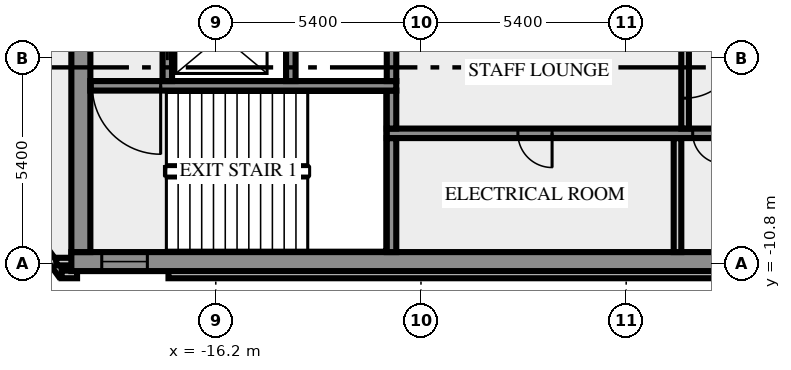
"""IFC4 building model, lengths in metres.
Left out: names, types, materials, properties, quantities, classifications, styles, units other than length and angle.
Written with IfcOpenShell. Run it as: python <this file> out.ifc"""

import sys

from ifc_helpers import new_model, si_unit, direction, frame, frame_2d, origin, place, context, subcontext, project, spatial, rectangle, extrude, element, fill, save


model = new_model("IFC4")
c1 = context("Model", 3, precision=1e-05, world=origin(), true_north=direction((0.0, 1.0)))
c2 = subcontext(c1, "Body", "Model", "MODEL_VIEW")
j1 = project(units=[si_unit("LENGTHUNIT", "METRE"), si_unit("PLANEANGLEUNIT", "RADIAN")], contexts=[c1])
p1 = place(None, origin())
s1 = spatial("IfcSite", under=j1, at=p1, CompositionType="ELEMENT")
p2 = place(p1, origin())
s2 = spatial("IfcBuilding", under=s1, at=p2, CompositionType="ELEMENT")
p3 = place(p2, frame((0.0, 0.0, 234.0)))
s3 = spatial("IfcBuildingStorey", under=s2, at=p3, CompositionType="ELEMENT", Elevation=234.0)
p4 = place(p3, frame((-21.833, -8.909, 0.0), z_axis=(0.0, 0.0, 1.0), x_axis=(0.587766567315, -0.809030569476, 0.0)))
e1 = element("IfcWall", 1, at=p4, inside=s3, PredefinedType="SOLIDWALL", context=c2, shape_type="SweptSolid", body=[
    extrude(rectangle(XDim=2.688, YDim=0.2, at=frame_2d((1.344, 0.0))), origin(), (0.0, 0.0, 1.0), 3.65),
])
p5 = place(p3, frame((-20.256, -11.088, 0.0), z_axis=(0.0, 0.0, 1.0), x_axis=(1.0, 0.0, 0.0)))
e2 = element("IfcWall", 2, at=p5, inside=s3, PredefinedType="SOLIDWALL", context=c2, shape_type="SweptSolid", body=[
    extrude(rectangle(XDim=0.406, YDim=0.2, at=frame_2d((0.203, 0.0))), origin(), (0.0, 0.0, 1.0), 3.65),
])
p6 = place(p3, frame((-17.444, -11.088, 0.0), z_axis=(0.0, 0.0, 1.0), x_axis=(1.0, 0.0, 0.0)))
e3 = element("IfcWall", 3, at=p6, inside=s3, PredefinedType="SOLIDWALL", context=c2, shape_type="SweptSolid", body=[
    extrude(rectangle(XDim=34.888, YDim=0.2, at=frame_2d((17.444, 0.0))), origin(), (0.0, 0.0, 1.0), 3.65),
])
p7 = place(p3, frame((-19.98, -10.75, 0.0), z_axis=(0.0, 0.0, 1.0), x_axis=(-1.0, 0.0, 0.0)))
e4 = element("IfcWall", 4, at=p7, inside=s3, PredefinedType="SOLIDWALL", context=c2, shape_type="SweptSolid", body=[
    extrude(rectangle(XDim=0.417, YDim=0.2, at=frame_2d((0.208, 0.0))), origin(), (0.0, 0.0, 1.0), 3.65),
])
p8 = place(p3, frame((-20.0, -10.75, 0.0), z_axis=(0.0, 0.0, 1.0), x_axis=(1.0, 0.0, 0.0)))
e5 = element("IfcWall", 5, at=p8, inside=s3, PredefinedType="SHEAR", context=c2, shape_type="SweptSolid", body=[
    extrude(rectangle(XDim=40.0, YDim=0.5, at=frame_2d((20.0, 0.0))), origin(), (0.0, 0.0, 1.0), 3.65),
])
p9 = place(p8, frame((0.8, 0.0, 1.0)))
e6 = element("IfcOpeningElement", 6, at=p9, cuts=e5, PredefinedType="OPENING", context=c2, shape_type="SweptSolid", body=[
    extrude(rectangle(XDim=1.2, YDim=1.2, at=frame_2d((0.6, 0.6))), frame((0.0, 0.26, 0.0), z_axis=(0.0, -1.0, 0.0), x_axis=(1.0, 0.0, 0.0)), (0.0, 0.0, 1.0), 0.52),
])
p10 = place(p8, frame((38.0, 0.0, 1.0)))
e7 = element("IfcOpeningElement", 7, at=p10, cuts=e5, PredefinedType="OPENING", context=c2, shape_type="SweptSolid", body=[
    extrude(rectangle(XDim=1.2, YDim=1.2, at=frame_2d((0.6, 0.6))), frame((0.0, 0.26, 0.0), z_axis=(0.0, -1.0, 0.0), x_axis=(1.0, 0.0, 0.0)), (0.0, 0.0, 1.0), 0.52),
])
p11 = place(p3, frame((-19.75, -10.5, 0.0), z_axis=(0.0, 0.0, 1.0), x_axis=(0.0, 1.0, 0.0)))
e8 = element("IfcWall", 8, at=p11, inside=s3, PredefinedType="SHEAR", context=c2, shape_type="SweptSolid", body=[
    extrude(rectangle(XDim=8.8, YDim=0.5, at=frame_2d((4.4, 0.0))), origin(), (0.0, 0.0, 1.0), 3.65),
])
p12 = place(p3, frame((-11.575, -10.5, 0.0), z_axis=(0.0, 0.0, 1.0), x_axis=(0.0, 1.0, 0.0)))
e9 = element("IfcWall", 9, at=p12, inside=s3, PredefinedType="SHEAR", context=c2, shape_type="SweptSolid", body=[
    extrude(rectangle(XDim=3.0, YDim=0.25, at=frame_2d((1.5, 0.0))), origin(), (0.0, 0.0, 1.0), 3.65),
])
p13 = place(p3, frame((-4.05, -10.5, 0.0), z_axis=(0.0, 0.0, 1.0), x_axis=(0.0, 1.0, 0.0)))
e10 = element("IfcWall", 10, at=p13, inside=s3, PredefinedType="SOLIDWALL", context=c2, shape_type="SweptSolid", body=[
    extrude(rectangle(XDim=3.0, YDim=0.2, at=frame_2d((1.5, 0.0))), origin(), (0.0, 0.0, 1.0), 3.65),
])
p14 = place(p3, frame((11.7, -7.375, 0.0), z_axis=(0.0, 0.0, 1.0), x_axis=(-1.0, 0.0, 0.0)))
e11 = element("IfcWall", 11, at=p14, inside=s3, PredefinedType="SHEAR", context=c2, shape_type="SweptSolid", body=[
    extrude(rectangle(XDim=23.4, YDim=0.25, at=frame_2d((11.7, 0.0))), origin(), (0.0, 0.0, 1.0), 3.65),
])
p15 = place(p14, frame((19.05, 0.0, 0.0)))
e12 = element("IfcOpeningElement", 12, at=p15, cuts=e11, PredefinedType="OPENING", context=c2, shape_type="SweptSolid", body=[
    extrude(rectangle(XDim=0.9, YDim=2.1, at=frame_2d((0.45, 1.05))), frame((0.0, 0.135, 0.0), z_axis=(0.0, -1.0, 0.0), x_axis=(1.0, 0.0, 0.0)), (0.0, 0.0, 1.0), 0.27),
])
p16 = place(p14, frame((14.55, 0.0, 0.0)))
e13 = element("IfcOpeningElement", 13, at=p16, cuts=e11, PredefinedType="OPENING", context=c2, shape_type="SweptSolid", body=[
    extrude(rectangle(XDim=0.8, YDim=2.1, at=frame_2d((0.4, 1.05))), frame((0.0, 0.135, 0.0), z_axis=(0.0, -1.0, 0.0), x_axis=(1.0, 0.0, 0.0)), (0.0, 0.0, 1.0), 0.27),
])
p17 = place(p14, frame((12.8, 0.0, 0.0)))
e14 = element("IfcOpeningElement", 14, at=p17, cuts=e11, PredefinedType="OPENING", context=c2, shape_type="SweptSolid", body=[
    extrude(rectangle(XDim=0.9, YDim=2.1, at=frame_2d((0.45, 1.05))), frame((0.0, 0.135, 0.0), z_axis=(0.0, -1.0, 0.0), x_axis=(1.0, 0.0, 0.0)), (0.0, 0.0, 1.0), 0.27),
])
p18 = place(p14, frame((10.7, 0.0, 0.0)))
e15 = element("IfcOpeningElement", 15, at=p18, cuts=e11, PredefinedType="OPENING", context=c2, shape_type="SweptSolid", body=[
    extrude(rectangle(XDim=0.9, YDim=2.1, at=frame_2d((0.45, 1.05))), frame((0.0, 0.135, 0.0), z_axis=(0.0, -1.0, 0.0), x_axis=(1.0, 0.0, 0.0)), (0.0, 0.0, 1.0), 0.27),
])
p19 = place(p14, frame((8.35, 0.0, 0.0)))
e16 = element("IfcOpeningElement", 16, at=p19, cuts=e11, PredefinedType="OPENING", context=c2, shape_type="SweptSolid", body=[
    extrude(rectangle(XDim=1.1, YDim=2.1, at=frame_2d((0.55, 1.05))), frame((0.0, 0.135, 0.0), z_axis=(0.0, -1.0, 0.0), x_axis=(1.0, 0.0, 0.0)), (0.0, 0.0, 1.0), 0.27),
])
p20 = place(p14, frame((5.85, 0.0, 0.0)))
e17 = element("IfcOpeningElement", 17, at=p20, cuts=e11, PredefinedType="OPENING", context=c2, shape_type="SweptSolid", body=[
    extrude(rectangle(XDim=1.1, YDim=2.1, at=frame_2d((0.55, 1.05))), frame((0.0, 0.135, 0.0), z_axis=(0.0, -1.0, 0.0), x_axis=(1.0, 0.0, 0.0)), (0.0, 0.0, 1.0), 0.27),
])
p21 = place(p14, frame((3.35, 0.0, 0.0)))
e18 = element("IfcOpeningElement", 18, at=p21, cuts=e11, PredefinedType="OPENING", context=c2, shape_type="SweptSolid", body=[
    extrude(rectangle(XDim=1.1, YDim=2.1, at=frame_2d((0.55, 1.05))), frame((0.0, 0.135, 0.0), z_axis=(0.0, -1.0, 0.0), x_axis=(1.0, 0.0, 0.0)), (0.0, 0.0, 1.0), 0.27),
])
p22 = place(p14, frame((0.85, 0.0, 0.0)))
e19 = element("IfcOpeningElement", 19, at=p22, cuts=e11, PredefinedType="OPENING", context=c2, shape_type="SweptSolid", body=[
    extrude(rectangle(XDim=1.1, YDim=2.1, at=frame_2d((0.55, 1.05))), frame((0.0, 0.135, 0.0), z_axis=(0.0, -1.0, 0.0), x_axis=(1.0, 0.0, 0.0)), (0.0, 0.0, 1.0), 0.27),
])
p23 = place(p3, frame((-11.575, -7.25, 0.0), z_axis=(0.0, 0.0, 1.0), x_axis=(0.0, 1.0, 0.0)))
e20 = element("IfcWall", 20, at=p23, inside=s3, PredefinedType="SHEAR", context=c2, shape_type="SweptSolid", body=[
    extrude(rectangle(XDim=1.0, YDim=0.25, at=frame_2d((0.5, 0.0))), origin(), (0.0, 0.0, 1.0), 3.65),
])
p24 = place(p3, frame((-3.85, -4.25, 0.0), z_axis=(0.0, 0.0, 1.0), x_axis=(0.0, -1.0, 0.0)))
e21 = element("IfcWall", 21, at=p24, inside=s3, PredefinedType="SOLIDWALL", context=c2, shape_type="SweptSolid", body=[
    extrude(rectangle(XDim=3.0, YDim=0.2, at=frame_2d((1.5, 0.0))), origin(), (0.0, 0.0, 1.0), 3.65),
])
p25 = place(p24, frame((0.8, 0.0, 0.0)))
e22 = element("IfcOpeningElement", 22, at=p25, cuts=e21, PredefinedType="OPENING", context=c2, shape_type="SweptSolid", body=[
    extrude(rectangle(XDim=1.4, YDim=2.1, at=frame_2d((0.7, 1.05))), frame((0.0, 0.11, 0.0), z_axis=(0.0, -1.0, 0.0), x_axis=(1.0, 0.0, 0.0)), (0.0, 0.0, 1.0), 0.22),
])
p26 = place(p3, frame((-11.45, -6.125, 0.0), z_axis=(0.0, 0.0, 1.0), x_axis=(-1.0, 0.0, 0.0)))
e23 = element("IfcWall", 23, at=p26, inside=s3, PredefinedType="SHEAR", context=c2, shape_type="SweptSolid", body=[
    extrude(rectangle(XDim=8.05, YDim=0.25, at=frame_2d((4.025, 0.0))), origin(), (0.0, 0.0, 1.0), 3.65),
])
p27 = place(p26, frame((6.2, 0.0, 0.0)))
e24 = element("IfcOpeningElement", 24, at=p27, cuts=e23, PredefinedType="OPENING", context=c2, shape_type="SweptSolid", body=[
    extrude(rectangle(XDim=1.8, YDim=2.1, at=frame_2d((0.9, 1.05))), frame((0.0, 0.135, 0.0), z_axis=(0.0, -1.0, 0.0), x_axis=(1.0, 0.0, 0.0)), (0.0, 0.0, 1.0), 0.27),
])
p28 = place(p3, frame((-17.475, -6.0, 0.0), z_axis=(0.0, 0.0, 1.0), x_axis=(0.0, 1.0, 0.0)))
e25 = element("IfcWall", 25, at=p28, inside=s3, PredefinedType="SHEAR", context=c2, shape_type="SweptSolid", body=[
    extrude(rectangle(XDim=4.3, YDim=0.25, at=frame_2d((2.15, 0.0))), origin(), (0.0, 0.0, 1.0), 3.65),
])
p29 = place(p28, frame((0.55, 0.0, 0.0)))
e26 = element("IfcOpeningElement", 26, at=p29, cuts=e25, PredefinedType="OPENING", context=c2, shape_type="SweptSolid", body=[
    extrude(rectangle(XDim=1.3, YDim=2.1, at=frame_2d((0.65, 1.05))), frame((0.0, 0.135, 0.0), z_axis=(0.0, -1.0, 0.0), x_axis=(1.0, 0.0, 0.0)), (0.0, 0.0, 1.0), 0.27),
])
for number, where, z_axis, x_axis in (
    (27, (-14.225, -6.0, 0.0), (0.0, 0.0, 1.0), (0.0, 1.0, 0.0)),
    (28, (-11.575, -6.0, 0.0), (0.0, 0.0, 1.0), (0.0, 1.0, 0.0)),
):
    element("IfcWall", number, at=place(p3, frame(where, z_axis=z_axis, x_axis=x_axis)), inside=s3, PredefinedType="SHEAR", context=c2, shape_type="SweptSolid", body=[
        extrude(rectangle(XDim=1.75, YDim=0.25, at=frame_2d((0.875, 0.0))), origin(), (0.0, 0.0, 1.0), 3.65),
    ])
p30 = place(p9, origin())
e29 = element("IfcWindow", 29, at=p30, inside=s3, PartitioningType="SINGLE_PANEL", PredefinedType="WINDOW", context=c2, shape_type="SweptSolid", body=[
    extrude(rectangle(XDim=1.2, YDim=1.2, at=frame_2d((0.6, 0.6))), frame((0.0, 0.03, 0.0), z_axis=(0.0, -1.0, 0.0), x_axis=(1.0, 0.0, 0.0)), (0.0, 0.0, 1.0), 0.06),
])
fill(e6, e29)
p31 = place(p15, origin())
e30 = element("IfcDoor", 30, at=p31, inside=s3, OperationType="SINGLE_SWING_RIGHT", PredefinedType="DOOR", context=c2, shape_type="SweptSolid", body=[
    extrude(rectangle(XDim=0.9, YDim=2.1, at=frame_2d((0.45, 1.05))), frame((0.0, 0.025, 0.0), z_axis=(0.0, -1.0, 0.0), x_axis=(1.0, 0.0, 0.0)), (0.0, 0.0, 1.0), 0.05),
])
fill(e12, e30)
p32 = place(p16, origin())
e31 = element("IfcDoor", 31, at=p32, inside=s3, OperationType="SINGLE_SWING_RIGHT", PredefinedType="DOOR", context=c2, shape_type="SweptSolid", body=[
    extrude(rectangle(XDim=0.8, YDim=2.1, at=frame_2d((0.4, 1.05))), frame((0.0, 0.025, 0.0), z_axis=(0.0, -1.0, 0.0), x_axis=(1.0, 0.0, 0.0)), (0.0, 0.0, 1.0), 0.05),
])
fill(e13, e31)
p33 = place(p25, origin())
e32 = element("IfcDoor", 32, at=p33, inside=s3, OperationType="DOUBLE_DOOR_SINGLE_SWING", PredefinedType="DOOR", context=c2, shape_type="SweptSolid", body=[
    extrude(rectangle(XDim=1.4, YDim=2.1, at=frame_2d((0.7, 1.05))), frame((0.0, 0.025, 0.0), z_axis=(0.0, -1.0, 0.0), x_axis=(1.0, 0.0, 0.0)), (0.0, 0.0, 1.0), 0.05),
])
fill(e22, e32)
p34 = place(p27, origin())
e33 = element("IfcDoor", 33, at=p34, inside=s3, OperationType="DOUBLE_DOOR_SINGLE_SWING", PredefinedType="DOOR", context=c2, shape_type="SweptSolid", body=[
    extrude(rectangle(XDim=1.8, YDim=2.1, at=frame_2d((0.9, 1.05))), frame((0.0, 0.025, 0.0), z_axis=(0.0, -1.0, 0.0), x_axis=(1.0, 0.0, 0.0)), (0.0, 0.0, 1.0), 0.05),
])
fill(e24, e33)
p35 = place(p29, origin())
e34 = element("IfcDoor", 34, at=p35, inside=s3, OperationType="DOUBLE_DOOR_SLIDING", PredefinedType="DOOR", context=c2, shape_type="SweptSolid", body=[
    extrude(rectangle(XDim=1.3, YDim=2.1, at=frame_2d((0.65, 1.05))), frame((0.0, 0.025, 0.0), z_axis=(0.0, -1.0, 0.0), x_axis=(1.0, 0.0, 0.0)), (0.0, 0.0, 1.0), 0.05),
])
fill(e26, e34)
save(model, sys.argv[1])
